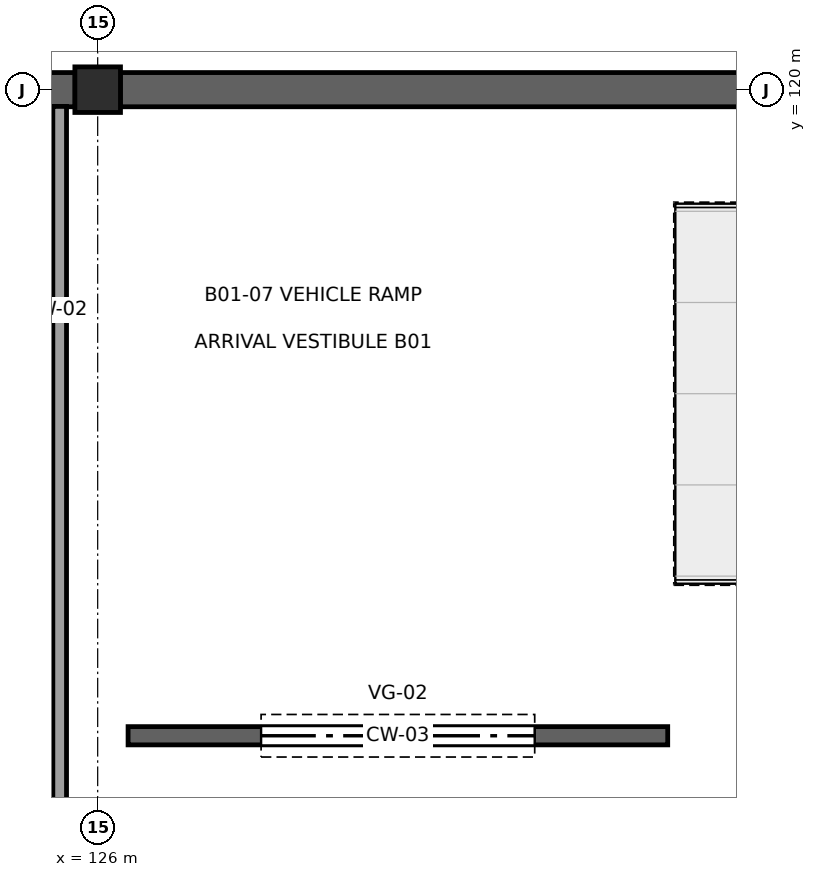
"""IFC4 building model, lengths in metres.
Left out: names, types, materials, properties, quantities, classifications, styles, units other than length and angle.
Written with IfcOpenShell. Run it as: python <this file> out.ifc"""

import sys

from ifc_helpers import new_model, si_unit, direction, frame, frame_2d, origin, origin_2d, place, context, subcontext, project, spatial, rectangle, extrude, element, fill, save


model = new_model("IFC4")
c1 = context("Model", 3, precision=1e-05, world=origin(), true_north=direction((0.0, 1.0)))
c2 = subcontext(c1, "Body", "Model", "MODEL_VIEW")
j1 = project(units=[si_unit("LENGTHUNIT", "METRE"), si_unit("PLANEANGLEUNIT", "RADIAN")], contexts=[c1])
p1 = place(None, origin())
s1 = spatial("IfcSite", under=j1, at=p1, CompositionType="ELEMENT")
p2 = place(p1, origin())
s2 = spatial("IfcBuilding", under=s1, at=p2, CompositionType="ELEMENT")
p3 = place(p2, frame((0.0, 0.0, -4.5)))
s3 = spatial("IfcBuildingStorey", under=s2, at=p3, CompositionType="ELEMENT", Elevation=-4.5)
p4 = place(p3, frame((126.0, 120.0, 0.0), z_axis=(0.0, 0.0, 1.0), x_axis=(1.0, 0.0, 0.0)))
e1 = element("IfcColumn", 1, at=p4, inside=s3, PredefinedType="COLUMN", context=c2, shape_type="SweptSolid", body=[
    extrude(rectangle(XDim=0.6, YDim=0.6, at=origin_2d()), origin(), (0.0, 0.0, 1.0), 4.5),
])
for number, where, z_axis, x_axis in (
    (2, (134.704, 120.0, 0.0), (0.0, 0.0, 1.0), (-1.0, 0.0, 0.0)),
    (3, (125.704, 120.0, 0.0), (0.0, 0.0, 1.0), (-1.0, 0.0, 0.0)),
):
    element("IfcWall", number, at=place(p3, frame(where, z_axis=z_axis, x_axis=x_axis)), inside=s3, PredefinedType="USERDEFINED", context=c2, shape_type="SweptSolid", body=[
        extrude(rectangle(XDim=8.408, YDim=0.45, at=frame_2d((4.204, 0.0))), origin(), (0.0, 0.0, 1.0), 4.32),
    ])
p5 = place(p3, frame((126.4, 111.5, 0.0), z_axis=(0.0, 0.0, 1.0), x_axis=(1.0, 0.0, 0.0)))
e4 = element("IfcWall", 4, at=p5, inside=s3, PredefinedType="SHEAR", context=c2, shape_type="SweptSolid", body=[
    extrude(rectangle(XDim=7.1, YDim=0.24, at=frame_2d((3.55, 0.0))), origin(), (0.0, 0.0, 1.0), 3.64),
])
p6 = place(p5, frame((1.75, 0.0, 0.0)))
e5 = element("IfcOpeningElement", 5, at=p6, cuts=e4, PredefinedType="OPENING", context=c2, shape_type="SweptSolid", body=[
    extrude(rectangle(XDim=3.6, YDim=2.6, at=frame_2d((1.8, 1.3))), frame((0.0, 0.135, 0.0), z_axis=(0.0, -1.0, 0.0), x_axis=(1.0, 0.0, 0.0)), (0.0, 0.0, 1.0), 0.27),
])
p7 = place(p3, frame((99.58, 119.5, 0.0), z_axis=(0.0, 0.0, 1.0), x_axis=(1.0, 0.0, 0.0)))
e6 = element("IfcWall", 6, at=p7, inside=s3, PredefinedType="PARTITIONING", context=c2, shape_type="SweptSolid", body=[
    extrude(rectangle(XDim=25.84, YDim=0.18, at=frame_2d((12.92, 0.0))), origin(), (0.0, 0.0, 1.0), 4.14),
])
p8 = place(p3, frame((125.5, 119.78, 0.0), z_axis=(0.0, 0.0, 1.0), x_axis=(0.0, -1.0, 0.0)))
e7 = element("IfcWall", 7, at=p8, inside=s3, PredefinedType="PARTITIONING", context=c2, shape_type="SweptSolid", body=[
    extrude(rectangle(XDim=11.5, YDim=0.18, at=frame_2d((5.75, 0.0))), origin(), (0.0, 0.0, 1.0), 4.14),
])
p9 = place(p6, frame((3.6, 0.0, 0.0), z_axis=(0.0, 0.0, 1.0), x_axis=(-1.0, 0.0, 0.0)))
e8 = element("IfcDoor", 8, at=p9, inside=s3, OperationType="ROLLINGUP", PredefinedType="GATE", context=c2, shape_type="SweptSolid", body=[
    extrude(rectangle(XDim=3.6, YDim=2.6, at=frame_2d((1.8, 1.3))), frame((0.0, 0.025, 0.0), z_axis=(0.0, -1.0, 0.0), x_axis=(1.0, 0.0, 0.0)), (0.0, 0.0, 1.0), 0.05),
])
fill(e5, e8)
save(model, sys.argv[1])
